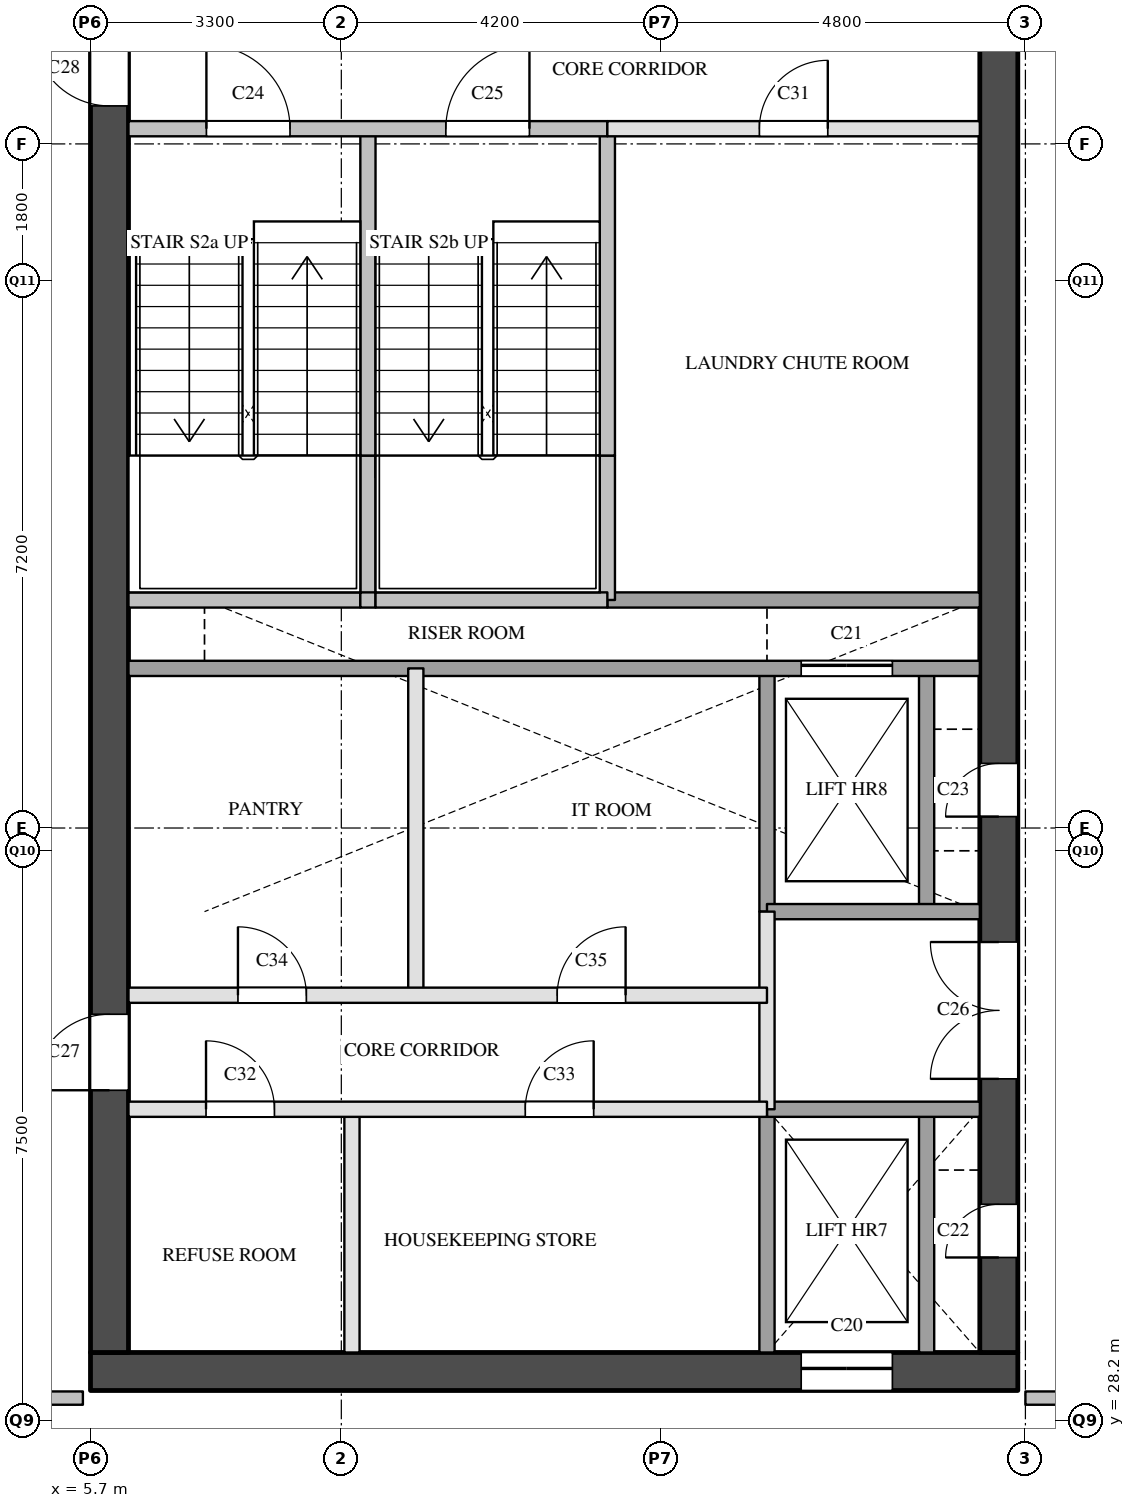
"""IFC4 building model, lengths in metres.
Left out: names, types, materials, properties, quantities, classifications, styles, units other than length and angle.
Written with IfcOpenShell. Run it as: python <this file> out.ifc"""

import sys

from ifc_helpers import new_model, si_unit, direction, frame, frame_2d, origin, place, context, subcontext, project, spatial, rectangle, extrude, element, fill, save


model = new_model("IFC4")
c1 = context("Model", 3, precision=1e-05, world=origin(), true_north=direction((0.0, 1.0)))
c2 = subcontext(c1, "Body", "Model", "MODEL_VIEW")
j1 = project(units=[si_unit("LENGTHUNIT", "METRE"), si_unit("PLANEANGLEUNIT", "RADIAN")], contexts=[c1])
p1 = place(None, origin())
s1 = spatial("IfcSite", under=j1, at=p1, CompositionType="ELEMENT")
p2 = place(p1, origin())
s2 = spatial("IfcBuilding", under=s1, at=p2, CompositionType="ELEMENT")
p3 = place(p2, frame((0.0, 0.0, 177.8)))
s3 = spatial("IfcBuildingStorey", under=s2, at=p3, CompositionType="ELEMENT", Elevation=177.8)
p4 = place(p3, frame((5.7, 28.85, 0.0), z_axis=(0.0, 0.0, 1.0), x_axis=(1.0, 0.0, 0.0)))
e1 = element("IfcWall", 1, at=p4, inside=s3, PredefinedType="SHEAR", context=c2, shape_type="SweptSolid", body=[
    extrude(rectangle(XDim=12.2, YDim=0.5, at=frame_2d((6.1, 0.0))), origin(), (0.0, 0.0, 1.0), 3.6),
])
p5 = place(p4, frame((9.35, 0.0, 0.0)))
e2 = element("IfcOpeningElement", 2, at=p5, cuts=e1, PredefinedType="OPENING", context=c2, shape_type="SweptSolid", body=[
    extrude(rectangle(XDim=1.2, YDim=2.1, at=frame_2d((0.6, 1.05))), frame((0.0, 0.26, 0.0), z_axis=(0.0, -1.0, 0.0), x_axis=(1.0, 0.0, 0.0)), (0.0, 0.0, 1.0), 0.52),
])
p6 = place(p3, frame((5.95, 29.1, 0.0), z_axis=(0.0, 0.0, 1.0), x_axis=(0.0, 1.0, 0.0)))
e3 = element("IfcWall", 3, at=p6, inside=s3, PredefinedType="SHEAR", context=c2, shape_type="SweptSolid", body=[
    extrude(rectangle(XDim=20.3, YDim=0.5, at=frame_2d((10.15, 0.0))), origin(), (0.0, 0.0, 1.0), 3.6),
])
p7 = place(p6, frame((3.45, 0.0, 0.0)))
e4 = element("IfcOpeningElement", 4, at=p7, cuts=e3, PredefinedType="OPENING", context=c2, shape_type="SweptSolid", body=[
    extrude(rectangle(XDim=1.0, YDim=2.1, at=frame_2d((0.5, 1.05))), frame((0.0, 0.26, 0.0), z_axis=(0.0, -1.0, 0.0), x_axis=(1.0, 0.0, 0.0)), (0.0, 0.0, 1.0), 0.52),
])
p8 = place(p6, frame((16.4, 0.0, 0.0)))
e5 = element("IfcOpeningElement", 5, at=p8, cuts=e3, PredefinedType="OPENING", context=c2, shape_type="SweptSolid", body=[
    extrude(rectangle(XDim=1.0, YDim=2.1, at=frame_2d((0.5, 1.05))), frame((0.0, 0.26, 0.0), z_axis=(0.0, -1.0, 0.0), x_axis=(1.0, 0.0, 0.0)), (0.0, 0.0, 1.0), 0.52),
])
p9 = place(p3, frame((17.65, 29.1, 0.0), z_axis=(0.0, 0.0, 1.0), x_axis=(0.0, 1.0, 0.0)))
e6 = element("IfcWall", 6, at=p9, inside=s3, PredefinedType="SHEAR", context=c2, shape_type="SweptSolid", body=[
    extrude(rectangle(XDim=20.3, YDim=0.5, at=frame_2d((10.15, 0.0))), origin(), (0.0, 0.0, 1.0), 3.6),
])
p10 = place(p9, frame((1.25, 0.0, 0.0)))
e7 = element("IfcOpeningElement", 7, at=p10, cuts=e6, PredefinedType="OPENING", context=c2, shape_type="SweptSolid", body=[
    extrude(rectangle(XDim=0.7, YDim=2.1, at=frame_2d((0.35, 1.05))), frame((0.0, 0.26, 0.0), z_axis=(0.0, -1.0, 0.0), x_axis=(1.0, 0.0, 0.0)), (0.0, 0.0, 1.0), 0.52),
])
p11 = place(p9, frame((7.05, 0.0, 0.0)))
e8 = element("IfcOpeningElement", 8, at=p11, cuts=e6, PredefinedType="OPENING", context=c2, shape_type="SweptSolid", body=[
    extrude(rectangle(XDim=0.7, YDim=2.1, at=frame_2d((0.35, 1.05))), frame((0.0, 0.26, 0.0), z_axis=(0.0, -1.0, 0.0), x_axis=(1.0, 0.0, 0.0)), (0.0, 0.0, 1.0), 0.52),
])
p12 = place(p9, frame((3.6, 0.0, 0.0)))
e9 = element("IfcOpeningElement", 9, at=p12, cuts=e6, PredefinedType="OPENING", context=c2, shape_type="SweptSolid", body=[
    extrude(rectangle(XDim=1.8, YDim=2.1, at=frame_2d((0.9, 1.05))), frame((0.0, 0.26, 0.0), z_axis=(0.0, -1.0, 0.0), x_axis=(1.0, 0.0, 0.0)), (0.0, 0.0, 1.0), 0.52),
])
p13 = place(p3, frame((9.14, 29.1, 0.0), z_axis=(0.0, 0.0, 1.0), x_axis=(0.0, 1.0, 0.0)))
e10 = element("IfcWall", 10, at=p13, inside=s3, PredefinedType="PARTITIONING", context=c2, shape_type="SweptSolid", body=[
    extrude(rectangle(XDim=3.2, YDim=0.2, at=frame_2d((1.6, 0.0))), origin(), (0.0, 0.0, 1.0), 3.6),
])
p14 = place(p3, frame((9.35, 39.0, 0.0), z_axis=(0.0, 0.0, 1.0), x_axis=(0.0, 1.0, 0.0)))
e11 = element("IfcWall", 11, at=p14, inside=s3, PredefinedType="SOLIDWALL", context=c2, shape_type="SweptSolid", body=[
    extrude(rectangle(XDim=1.9, YDim=0.2, at=frame_2d((0.95, 0.0))), origin(), (0.0, 0.0, 1.0), 3.6),
])
p15 = place(p3, frame((9.35, 40.9, 0.0), z_axis=(0.0, 0.0, 1.0), x_axis=(0.0, 1.0, 0.0)))
e12 = element("IfcWall", 12, at=p15, inside=s3, PredefinedType="SOLIDWALL", context=c2, shape_type="SweptSolid", body=[
    extrude(rectangle(XDim=4.3, YDim=0.2, at=frame_2d((2.15, 0.0))), origin(), (0.0, 0.0, 1.0), 3.6),
])
p16 = place(p3, frame((9.98, 33.8, 0.0), z_axis=(0.0, 0.0, 1.0), x_axis=(0.0, 1.0, 0.0)))
e13 = element("IfcWall", 13, at=p16, inside=s3, PredefinedType="PARTITIONING", context=c2, shape_type="SweptSolid", body=[
    extrude(rectangle(XDim=4.3, YDim=0.2, at=frame_2d((2.15, 0.0))), origin(), (0.0, 0.0, 1.0), 3.6),
])
p17 = place(p3, frame((12.5, 39.0, 0.0), z_axis=(0.0, 0.0, 1.0), x_axis=(0.0, 1.0, 0.0)))
e14 = element("IfcWall", 14, at=p17, inside=s3, PredefinedType="SOLIDWALL", context=c2, shape_type="SweptSolid", body=[
    extrude(rectangle(XDim=1.9, YDim=0.2, at=frame_2d((0.95, 0.0))), origin(), (0.0, 0.0, 1.0), 3.6),
])
p18 = place(p3, frame((12.5, 40.9, 0.0), z_axis=(0.0, 0.0, 1.0), x_axis=(0.0, 1.0, 0.0)))
e15 = element("IfcWall", 15, at=p18, inside=s3, PredefinedType="SOLIDWALL", context=c2, shape_type="SweptSolid", body=[
    extrude(rectangle(XDim=4.3, YDim=0.2, at=frame_2d((2.15, 0.0))), origin(), (0.0, 0.0, 1.0), 3.6),
])
p19 = place(p3, frame((14.6, 32.3, 0.0), z_axis=(0.0, 0.0, 1.0), x_axis=(0.0, 1.0, 0.0)))
e16 = element("IfcWall", 16, at=p19, inside=s3, PredefinedType="PARTITIONING", context=c2, shape_type="SweptSolid", body=[
    extrude(rectangle(XDim=2.6, YDim=0.2, at=frame_2d((1.3, 0.0))), origin(), (0.0, 0.0, 1.0), 3.6),
])
p20 = place(p3, frame((14.6, 29.1, 0.0), z_axis=(0.0, 0.0, 1.0), x_axis=(0.0, 1.0, 0.0)))
e17 = element("IfcWall", 17, at=p20, inside=s3, PredefinedType="SOLIDWALL", context=c2, shape_type="SweptSolid", body=[
    extrude(rectangle(XDim=3.2, YDim=0.2, at=frame_2d((1.6, 0.0))), origin(), (0.0, 0.0, 1.0), 3.6),
])
p21 = place(p3, frame((14.6, 34.9, 0.0), z_axis=(0.0, 0.0, 1.0), x_axis=(0.0, 1.0, 0.0)))
e18 = element("IfcWall", 18, at=p21, inside=s3, PredefinedType="SOLIDWALL", context=c2, shape_type="SweptSolid", body=[
    extrude(rectangle(XDim=3.2, YDim=0.2, at=frame_2d((1.6, 0.0))), origin(), (0.0, 0.0, 1.0), 3.6),
])
p22 = place(p3, frame((16.7, 29.1, 0.0), z_axis=(0.0, 0.0, 1.0), x_axis=(0.0, 1.0, 0.0)))
e19 = element("IfcWall", 19, at=p22, inside=s3, PredefinedType="SOLIDWALL", context=c2, shape_type="SweptSolid", body=[
    extrude(rectangle(XDim=3.2, YDim=0.2, at=frame_2d((1.6, 0.0))), origin(), (0.0, 0.0, 1.0), 3.6),
])
p23 = place(p3, frame((16.7, 34.9, 0.0), z_axis=(0.0, 0.0, 1.0), x_axis=(0.0, 1.0, 0.0)))
e20 = element("IfcWall", 20, at=p23, inside=s3, PredefinedType="SOLIDWALL", context=c2, shape_type="SweptSolid", body=[
    extrude(rectangle(XDim=3.2, YDim=0.2, at=frame_2d((1.6, 0.0))), origin(), (0.0, 0.0, 1.0), 3.6),
])
p24 = place(p3, frame((6.2, 32.3, 0.0), z_axis=(0.0, 0.0, 1.0), x_axis=(1.0, 0.0, 0.0)))
e21 = element("IfcWall", 21, at=p24, inside=s3, PredefinedType="PARTITIONING", context=c2, shape_type="SweptSolid", body=[
    extrude(rectangle(XDim=8.4, YDim=0.2, at=frame_2d((4.2, 0.0))), origin(), (0.0, 0.0, 1.0), 3.6),
])
p25 = place(p24, frame((1.02, 0.0, 0.0)))
e22 = element("IfcOpeningElement", 22, at=p25, cuts=e21, PredefinedType="OPENING", context=c2, shape_type="SweptSolid", body=[
    extrude(rectangle(XDim=0.9, YDim=2.1, at=frame_2d((0.45, 1.05))), frame((0.0, 0.11, 0.0), z_axis=(0.0, -1.0, 0.0), x_axis=(1.0, 0.0, 0.0)), (0.0, 0.0, 1.0), 0.22),
])
p26 = place(p24, frame((5.22, 0.0, 0.0)))
e23 = element("IfcOpeningElement", 23, at=p26, cuts=e21, PredefinedType="OPENING", context=c2, shape_type="SweptSolid", body=[
    extrude(rectangle(XDim=0.9, YDim=2.1, at=frame_2d((0.45, 1.05))), frame((0.0, 0.11, 0.0), z_axis=(0.0, -1.0, 0.0), x_axis=(1.0, 0.0, 0.0)), (0.0, 0.0, 1.0), 0.22),
])
p27 = place(p3, frame((14.6, 32.3, 0.0), z_axis=(0.0, 0.0, 1.0), x_axis=(1.0, 0.0, 0.0)))
e24 = element("IfcWall", 24, at=p27, inside=s3, PredefinedType="SOLIDWALL", context=c2, shape_type="SweptSolid", body=[
    extrude(rectangle(XDim=2.8, YDim=0.2, at=frame_2d((1.4, 0.0))), origin(), (0.0, 0.0, 1.0), 3.6),
])
p28 = place(p3, frame((6.2, 33.8, 0.0), z_axis=(0.0, 0.0, 1.0), x_axis=(1.0, 0.0, 0.0)))
e25 = element("IfcWall", 25, at=p28, inside=s3, PredefinedType="PARTITIONING", context=c2, shape_type="SweptSolid", body=[
    extrude(rectangle(XDim=8.4, YDim=0.2, at=frame_2d((4.2, 0.0))), origin(), (0.0, 0.0, 1.0), 3.6),
])
p29 = place(p28, frame((1.44, 0.0, 0.0)))
e26 = element("IfcOpeningElement", 26, at=p29, cuts=e25, PredefinedType="OPENING", context=c2, shape_type="SweptSolid", body=[
    extrude(rectangle(XDim=0.9, YDim=2.1, at=frame_2d((0.45, 1.05))), frame((0.0, 0.11, 0.0), z_axis=(0.0, -1.0, 0.0), x_axis=(1.0, 0.0, 0.0)), (0.0, 0.0, 1.0), 0.22),
])
p30 = place(p28, frame((5.64, 0.0, 0.0)))
e27 = element("IfcOpeningElement", 27, at=p30, cuts=e25, PredefinedType="OPENING", context=c2, shape_type="SweptSolid", body=[
    extrude(rectangle(XDim=0.9, YDim=2.1, at=frame_2d((0.45, 1.05))), frame((0.0, 0.11, 0.0), z_axis=(0.0, -1.0, 0.0), x_axis=(1.0, 0.0, 0.0)), (0.0, 0.0, 1.0), 0.22),
])
p31 = place(p3, frame((14.6, 34.9, 0.0), z_axis=(0.0, 0.0, 1.0), x_axis=(1.0, 0.0, 0.0)))
e28 = element("IfcWall", 28, at=p31, inside=s3, PredefinedType="SOLIDWALL", context=c2, shape_type="SweptSolid", body=[
    extrude(rectangle(XDim=2.8, YDim=0.2, at=frame_2d((1.4, 0.0))), origin(), (0.0, 0.0, 1.0), 3.6),
])
p32 = place(p3, frame((6.2, 38.1, 0.0), z_axis=(0.0, 0.0, 1.0), x_axis=(1.0, 0.0, 0.0)))
e29 = element("IfcWall", 29, at=p32, inside=s3, PredefinedType="SOLIDWALL", context=c2, shape_type="SweptSolid", body=[
    extrude(rectangle(XDim=11.2, YDim=0.2, at=frame_2d((5.6, 0.0))), origin(), (0.0, 0.0, 1.0), 3.6),
])
p33 = place(p32, frame((8.85, 0.0, 0.0)))
e30 = element("IfcOpeningElement", 30, at=p33, cuts=e29, PredefinedType="OPENING", context=c2, shape_type="SweptSolid", body=[
    extrude(rectangle(XDim=1.2, YDim=2.1, at=frame_2d((0.6, 1.05))), frame((0.0, 0.11, 0.0), z_axis=(0.0, -1.0, 0.0), x_axis=(1.0, 0.0, 0.0)), (0.0, 0.0, 1.0), 0.22),
])
p34 = place(p3, frame((12.5, 39.0, 0.0), z_axis=(0.0, 0.0, 1.0), x_axis=(1.0, 0.0, 0.0)))
e31 = element("IfcWall", 31, at=p34, inside=s3, PredefinedType="SOLIDWALL", context=c2, shape_type="SweptSolid", body=[
    extrude(rectangle(XDim=4.9, YDim=0.2, at=frame_2d((2.45, 0.0))), origin(), (0.0, 0.0, 1.0), 3.6),
])
p35 = place(p3, frame((6.2, 39.0, 0.0), z_axis=(0.0, 0.0, 1.0), x_axis=(1.0, 0.0, 0.0)))
e32 = element("IfcWall", 32, at=p35, inside=s3, PredefinedType="SOLIDWALL", context=c2, shape_type="SweptSolid", body=[
    extrude(rectangle(XDim=3.05, YDim=0.2, at=frame_2d((1.525, 0.0))), origin(), (0.0, 0.0, 1.0), 3.6),
])
p36 = place(p3, frame((9.25, 39.0, 0.0), z_axis=(0.0, 0.0, 1.0), x_axis=(1.0, 0.0, 0.0)))
e33 = element("IfcWall", 33, at=p36, inside=s3, PredefinedType="SOLIDWALL", context=c2, shape_type="SweptSolid", body=[
    extrude(rectangle(XDim=0.2, YDim=0.2, at=frame_2d((0.1, 0.0))), origin(), (0.0, 0.0, 1.0), 3.6),
])
p37 = place(p3, frame((9.45, 39.0, 0.0), z_axis=(0.0, 0.0, 1.0), x_axis=(1.0, 0.0, 0.0)))
e34 = element("IfcWall", 34, at=p37, inside=s3, PredefinedType="SOLIDWALL", context=c2, shape_type="SweptSolid", body=[
    extrude(rectangle(XDim=3.05, YDim=0.2, at=frame_2d((1.525, 0.0))), origin(), (0.0, 0.0, 1.0), 3.6),
])
p38 = place(p3, frame((12.5, 45.2, 0.0), z_axis=(0.0, 0.0, 1.0), x_axis=(1.0, 0.0, 0.0)))
e35 = element("IfcWall", 35, at=p38, inside=s3, PredefinedType="PARTITIONING", context=c2, shape_type="SweptSolid", body=[
    extrude(rectangle(XDim=4.9, YDim=0.2, at=frame_2d((2.45, 0.0))), origin(), (0.0, 0.0, 1.0), 3.6),
])
p39 = place(p38, frame((2.0, 0.0, 0.0)))
e36 = element("IfcOpeningElement", 36, at=p39, cuts=e35, PredefinedType="OPENING", context=c2, shape_type="SweptSolid", body=[
    extrude(rectangle(XDim=0.9, YDim=2.1, at=frame_2d((0.45, 1.05))), frame((0.0, 0.11, 0.0), z_axis=(0.0, -1.0, 0.0), x_axis=(1.0, 0.0, 0.0)), (0.0, 0.0, 1.0), 0.22),
])
p40 = place(p3, frame((6.2, 45.2, 0.0), z_axis=(0.0, 0.0, 1.0), x_axis=(1.0, 0.0, 0.0)))
e37 = element("IfcWall", 37, at=p40, inside=s3, PredefinedType="SOLIDWALL", context=c2, shape_type="SweptSolid", body=[
    extrude(rectangle(XDim=6.3, YDim=0.2, at=frame_2d((3.15, 0.0))), origin(), (0.0, 0.0, 1.0), 3.6),
])
p41 = place(p40, frame((1.025, 0.0, 0.0)))
e38 = element("IfcOpeningElement", 38, at=p41, cuts=e37, PredefinedType="OPENING", context=c2, shape_type="SweptSolid", body=[
    extrude(rectangle(XDim=1.1, YDim=2.1, at=frame_2d((0.55, 1.05))), frame((0.0, 0.11, 0.0), z_axis=(0.0, -1.0, 0.0), x_axis=(1.0, 0.0, 0.0)), (0.0, 0.0, 1.0), 0.22),
])
p42 = place(p40, frame((4.175, 0.0, 0.0)))
e39 = element("IfcOpeningElement", 39, at=p42, cuts=e37, PredefinedType="OPENING", context=c2, shape_type="SweptSolid", body=[
    extrude(rectangle(XDim=1.1, YDim=2.1, at=frame_2d((0.55, 1.05))), frame((0.0, 0.11, 0.0), z_axis=(0.0, -1.0, 0.0), x_axis=(1.0, 0.0, 0.0)), (0.0, 0.0, 1.0), 0.22),
])
for number, where, z_axis, x_axis in (
    (40, (4.1, 28.5, 0.0), (0.0, 0.0, 1.0), (1.0, 0.0, 0.0)),
    (41, (18.0, 28.5, 0.0), (0.0, 0.0, 1.0), (1.0, 0.0, 0.0)),
):
    element("IfcWall", number, at=place(p3, frame(where, z_axis=z_axis, x_axis=x_axis)), inside=s3, PredefinedType="PARTITIONING", context=c2, shape_type="SweptSolid", body=[
        extrude(rectangle(XDim=1.5, YDim=0.175, at=frame_2d((0.75, 0.0))), origin(), (0.0, 0.0, 1.0), 3.6),
    ])
p43 = place(p5, origin())
e42 = element("IfcDoor", 42, at=p43, inside=s3, OperationType="SLIDING_TO_LEFT", PredefinedType="DOOR", context=c2, shape_type="SweptSolid", body=[
    extrude(rectangle(XDim=1.2, YDim=2.1, at=frame_2d((0.6, 1.05))), frame((0.0, 0.025, 0.0), z_axis=(0.0, -1.0, 0.0), x_axis=(1.0, 0.0, 0.0)), (0.0, 0.0, 1.0), 0.05),
])
fill(e2, e42)
p44 = place(p33, origin())
e43 = element("IfcDoor", 43, at=p44, inside=s3, OperationType="SLIDING_TO_LEFT", PredefinedType="DOOR", context=c2, shape_type="SweptSolid", body=[
    extrude(rectangle(XDim=1.2, YDim=2.1, at=frame_2d((0.6, 1.05))), frame((0.0, 0.025, 0.0), z_axis=(0.0, -1.0, 0.0), x_axis=(1.0, 0.0, 0.0)), (0.0, 0.0, 1.0), 0.05),
])
fill(e30, e43)
p45 = place(p10, origin())
e44 = element("IfcDoor", 44, at=p45, inside=s3, OperationType="SINGLE_SWING_LEFT", PredefinedType="DOOR", context=c2, shape_type="SweptSolid", body=[
    extrude(rectangle(XDim=0.7, YDim=2.1, at=frame_2d((0.35, 1.05))), frame((0.0, 0.025, 0.0), z_axis=(0.0, -1.0, 0.0), x_axis=(1.0, 0.0, 0.0)), (0.0, 0.0, 1.0), 0.05),
])
fill(e7, e44)
p46 = place(p11, origin())
e45 = element("IfcDoor", 45, at=p46, inside=s3, OperationType="SINGLE_SWING_LEFT", PredefinedType="DOOR", context=c2, shape_type="SweptSolid", body=[
    extrude(rectangle(XDim=0.7, YDim=2.1, at=frame_2d((0.35, 1.05))), frame((0.0, 0.025, 0.0), z_axis=(0.0, -1.0, 0.0), x_axis=(1.0, 0.0, 0.0)), (0.0, 0.0, 1.0), 0.05),
])
fill(e8, e45)
p47 = place(p41, origin())
e46 = element("IfcDoor", 46, at=p47, inside=s3, OperationType="SINGLE_SWING_LEFT", PredefinedType="DOOR", context=c2, shape_type="SweptSolid", body=[
    extrude(rectangle(XDim=1.1, YDim=2.1, at=frame_2d((0.55, 1.05))), frame((0.0, 0.025, 0.0), z_axis=(0.0, -1.0, 0.0), x_axis=(1.0, 0.0, 0.0)), (0.0, 0.0, 1.0), 0.05),
])
fill(e38, e46)
p48 = place(p42, origin())
e47 = element("IfcDoor", 47, at=p48, inside=s3, OperationType="SINGLE_SWING_RIGHT", PredefinedType="DOOR", context=c2, shape_type="SweptSolid", body=[
    extrude(rectangle(XDim=1.1, YDim=2.1, at=frame_2d((0.55, 1.05))), frame((0.0, 0.025, 0.0), z_axis=(0.0, -1.0, 0.0), x_axis=(1.0, 0.0, 0.0)), (0.0, 0.0, 1.0), 0.05),
])
fill(e39, e47)
p49 = place(p12, origin())
e48 = element("IfcDoor", 48, at=p49, inside=s3, OperationType="DOUBLE_DOOR_SINGLE_SWING", PredefinedType="DOOR", context=c2, shape_type="SweptSolid", body=[
    extrude(rectangle(XDim=1.8, YDim=2.1, at=frame_2d((0.9, 1.05))), frame((0.0, 0.025, 0.0), z_axis=(0.0, -1.0, 0.0), x_axis=(1.0, 0.0, 0.0)), (0.0, 0.0, 1.0), 0.05),
])
fill(e9, e48)
p50 = place(p7, origin())
e49 = element("IfcDoor", 49, at=p50, inside=s3, OperationType="SINGLE_SWING_LEFT", PredefinedType="DOOR", context=c2, shape_type="SweptSolid", body=[
    extrude(rectangle(XDim=1.0, YDim=2.1, at=frame_2d((0.5, 1.05))), frame((0.0, 0.025, 0.0), z_axis=(0.0, -1.0, 0.0), x_axis=(1.0, 0.0, 0.0)), (0.0, 0.0, 1.0), 0.05),
])
fill(e4, e49)
p51 = place(p8, origin())
e50 = element("IfcDoor", 50, at=p51, inside=s3, OperationType="SINGLE_SWING_RIGHT", PredefinedType="DOOR", context=c2, shape_type="SweptSolid", body=[
    extrude(rectangle(XDim=1.0, YDim=2.1, at=frame_2d((0.5, 1.05))), frame((0.0, 0.025, 0.0), z_axis=(0.0, -1.0, 0.0), x_axis=(1.0, 0.0, 0.0)), (0.0, 0.0, 1.0), 0.05),
])
fill(e5, e50)
p52 = place(p39, origin())
e51 = element("IfcDoor", 51, at=p52, inside=s3, OperationType="SINGLE_SWING_RIGHT", PredefinedType="DOOR", context=c2, shape_type="SweptSolid", body=[
    extrude(rectangle(XDim=0.9, YDim=2.1, at=frame_2d((0.45, 1.05))), frame((0.0, 0.025, 0.0), z_axis=(0.0, -1.0, 0.0), x_axis=(1.0, 0.0, 0.0)), (0.0, 0.0, 1.0), 0.05),
])
fill(e36, e51)
p53 = place(p25, origin())
e52 = element("IfcDoor", 52, at=p53, inside=s3, OperationType="SINGLE_SWING_LEFT", PredefinedType="DOOR", context=c2, shape_type="SweptSolid", body=[
    extrude(rectangle(XDim=0.9, YDim=2.1, at=frame_2d((0.45, 1.05))), frame((0.0, 0.025, 0.0), z_axis=(0.0, -1.0, 0.0), x_axis=(1.0, 0.0, 0.0)), (0.0, 0.0, 1.0), 0.05),
])
fill(e22, e52)
p54 = place(p26, origin())
e53 = element("IfcDoor", 53, at=p54, inside=s3, OperationType="SINGLE_SWING_RIGHT", PredefinedType="DOOR", context=c2, shape_type="SweptSolid", body=[
    extrude(rectangle(XDim=0.9, YDim=2.1, at=frame_2d((0.45, 1.05))), frame((0.0, 0.025, 0.0), z_axis=(0.0, -1.0, 0.0), x_axis=(1.0, 0.0, 0.0)), (0.0, 0.0, 1.0), 0.05),
])
fill(e23, e53)
p55 = place(p29, origin())
e54 = element("IfcDoor", 54, at=p55, inside=s3, OperationType="SINGLE_SWING_LEFT", PredefinedType="DOOR", context=c2, shape_type="SweptSolid", body=[
    extrude(rectangle(XDim=0.9, YDim=2.1, at=frame_2d((0.45, 1.05))), frame((0.0, 0.025, 0.0), z_axis=(0.0, -1.0, 0.0), x_axis=(1.0, 0.0, 0.0)), (0.0, 0.0, 1.0), 0.05),
])
fill(e26, e54)
p56 = place(p30, origin())
e55 = element("IfcDoor", 55, at=p56, inside=s3, OperationType="SINGLE_SWING_RIGHT", PredefinedType="DOOR", context=c2, shape_type="SweptSolid", body=[
    extrude(rectangle(XDim=0.9, YDim=2.1, at=frame_2d((0.45, 1.05))), frame((0.0, 0.025, 0.0), z_axis=(0.0, -1.0, 0.0), x_axis=(1.0, 0.0, 0.0)), (0.0, 0.0, 1.0), 0.05),
])
fill(e27, e55)
save(model, sys.argv[1])
